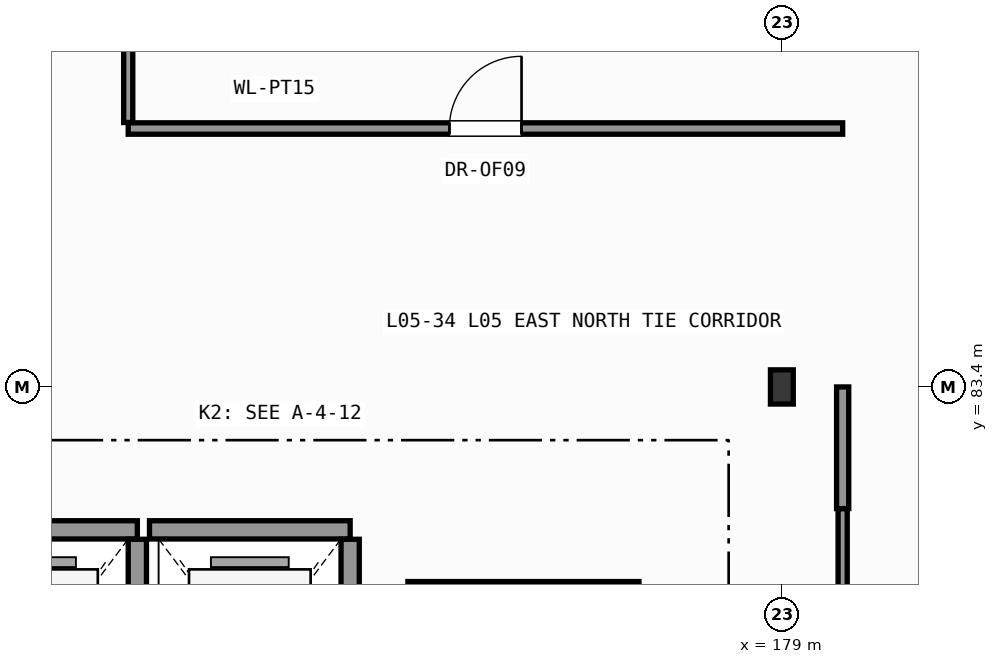
"""IFC4 building model, lengths in metres.
Left out: names, types, materials, properties, quantities, classifications, styles, units other than length and angle.
Written with IfcOpenShell. Run it as: python <this file> out.ifc"""

import sys

from ifc_helpers import new_model, si_unit, direction, frame, frame_2d, origin, origin_2d, place, context, subcontext, project, spatial, rectangle, i_section, extrude, element, fill, save


model = new_model("IFC4")
c1 = context("Model", 3, precision=1e-05, world=origin(), true_north=direction((0.0, 1.0)))
c2 = subcontext(c1, "Body", "Model", "MODEL_VIEW")
j1 = project(units=[si_unit("LENGTHUNIT", "METRE"), si_unit("PLANEANGLEUNIT", "RADIAN")], contexts=[c1])
p1 = place(None, origin())
s1 = spatial("IfcSite", under=j1, at=p1, CompositionType="ELEMENT")
p2 = place(p1, origin())
s2 = spatial("IfcBuilding", under=s1, at=p2, CompositionType="ELEMENT")
p3 = place(p2, frame((0.0, 0.0, 22.2)))
s3 = spatial("IfcBuildingStorey", under=s2, at=p3, CompositionType="ELEMENT", Elevation=22.2)
p4 = place(p3, frame((179.0, 83.4, 0.0), z_axis=(0.0, 0.0, 1.0), x_axis=(1.0, 0.0, 0.0)))
e1 = element("IfcColumn", 1, at=p4, inside=s3, PredefinedType="COLUMN", context=c2, shape_type="SweptSolid", body=[
    extrude(i_section(OverallWidth=0.3, OverallDepth=0.45, WebThickness=0.014, FlangeThickness=0.026, FilletRadius=0.027, at=origin_2d()), origin(), (0.0, 0.0, 1.0), 4.2),
])
p5 = place(p3, frame((167.88, 81.52, 0.0), z_axis=(0.0, 0.0, 1.0), x_axis=(1.0, 0.0, 0.0)))
e2 = element("IfcWall", 2, at=p5, inside=s3, PredefinedType="SHEAR", context=c2, shape_type="SweptSolid", body=[
    extrude(rectangle(XDim=2.64, YDim=0.24, at=frame_2d((1.32, 0.0))), origin(), (0.0, 0.0, 1.0), 3.98),
])
p6 = place(p3, frame((170.52, 78.204, 0.0), z_axis=(0.0, 0.0, 1.0), x_axis=(0.0, 1.0, 0.0)))
e3 = element("IfcWall", 3, at=p6, inside=s3, PredefinedType="SHEAR", context=c2, shape_type="SweptSolid", body=[
    extrude(rectangle(XDim=3.192, YDim=0.24, at=frame_2d((1.596, 0.0))), origin(), (0.0, 0.0, 1.0), 3.98),
])
p7 = place(p3, frame((170.68, 81.52, 0.0), z_axis=(0.0, 0.0, 1.0), x_axis=(1.0, 0.0, 0.0)))
e4 = element("IfcWall", 4, at=p7, inside=s3, PredefinedType="SHEAR", context=c2, shape_type="SweptSolid", body=[
    extrude(rectangle(XDim=2.64, YDim=0.24, at=frame_2d((1.32, 0.0))), origin(), (0.0, 0.0, 1.0), 3.98),
])
p8 = place(p3, frame((173.32, 78.204, 0.0), z_axis=(0.0, 0.0, 1.0), x_axis=(0.0, 1.0, 0.0)))
e5 = element("IfcWall", 5, at=p8, inside=s3, PredefinedType="SHEAR", context=c2, shape_type="SweptSolid", body=[
    extrude(rectangle(XDim=3.192, YDim=0.24, at=frame_2d((1.596, 0.0))), origin(), (0.0, 0.0, 1.0), 3.98),
])
p9 = place(p3, frame((174.08, 80.72, 0.0), z_axis=(0.0, 0.0, 1.0), x_axis=(1.0, 0.0, 0.0)))
e6 = element("IfcWall", 6, at=p9, inside=s3, PredefinedType="SHEAR", context=c2, shape_type="SweptSolid", body=[
    extrude(rectangle(XDim=3.04, YDim=0.24, at=frame_2d((1.52, 0.0))), origin(), (0.0, 0.0, 1.0), 3.98),
])
p10 = place(p3, frame((179.8, 73.5, 0.0), z_axis=(0.0, 0.0, 1.0), x_axis=(0.0, 1.0, 0.0)))
e7 = element("IfcWall", 7, at=p10, inside=s3, PredefinedType="PARTITIONING", context=c2, shape_type="SweptSolid", body=[
    extrude(rectangle(XDim=8.3, YDim=0.12, at=frame_2d((4.15, 0.0))), origin(), (0.0, 0.0, 1.0), 3.98),
])
p11 = place(p10, frame((4.31, 0.0, 0.0)))
e8 = element("IfcOpeningElement", 8, at=p11, cuts=e7, PredefinedType="OPENING", context=c2, shape_type="SweptSolid", body=[
    extrude(rectangle(XDim=2.2, YDim=2.6, at=frame_2d((1.1, 1.3))), frame((0.0, 0.07, 0.0), z_axis=(0.0, -1.0, 0.0), x_axis=(1.0, 0.0, 0.0)), (0.0, 0.0, 1.0), 0.14),
])
p12 = place(p3, frame((179.8, 81.8, 0.0), z_axis=(0.0, 0.0, 1.0), x_axis=(0.0, 1.0, 0.0)))
e9 = element("IfcWall", 9, at=p12, inside=s3, PredefinedType="PARTITIONING", context=c2, shape_type="SweptSolid", body=[
    extrude(rectangle(XDim=1.6, YDim=0.16, at=frame_2d((0.8, 0.0))), origin(), (0.0, 0.0, 1.0), 3.98),
])
p13 = place(p3, frame((170.4, 86.8, 0.0), z_axis=(0.0, 0.0, 1.0), x_axis=(1.0, 0.0, 0.0)))
e10 = element("IfcWall", 10, at=p13, inside=s3, PredefinedType="PARTITIONING", context=c2, shape_type="SweptSolid", body=[
    extrude(rectangle(XDim=9.4, YDim=0.15, at=frame_2d((4.7, 0.0))), origin(), (0.0, 0.0, 1.0), 3.665),
])
p14 = place(p13, frame((4.225, 0.0, 0.0)))
e11 = element("IfcOpeningElement", 11, at=p14, cuts=e10, PredefinedType="OPENING", context=c2, shape_type="SweptSolid", body=[
    extrude(rectangle(XDim=0.95, YDim=2.1, at=frame_2d((0.475, 1.05))), frame((0.0, 0.085, 0.0), z_axis=(0.0, -1.0, 0.0), x_axis=(1.0, 0.0, 0.0)), (0.0, 0.0, 1.0), 0.17),
])
p15 = place(p3, frame((170.4, 86.879, 0.0), z_axis=(0.0, 0.0, 1.0), x_axis=(0.0, 1.0, 0.0)))
e12 = element("IfcWall", 12, at=p15, inside=s3, PredefinedType="PARTITIONING", context=c2, shape_type="SweptSolid", body=[
    extrude(rectangle(XDim=11.121, YDim=0.12, at=frame_2d((5.561, 0.0))), origin(), (0.0, 0.0, 1.0), 3.98),
])
p16 = place(p15, frame((5.035, 0.0, 0.0)))
e13 = element("IfcOpeningElement", 13, at=p16, cuts=e12, PredefinedType="OPENING", context=c2, shape_type="SweptSolid", body=[
    extrude(rectangle(XDim=1.05, YDim=2.2, at=frame_2d((0.525, 1.1))), frame((0.0, 0.07, 0.0), z_axis=(0.0, -1.0, 0.0), x_axis=(1.0, 0.0, 0.0)), (0.0, 0.0, 1.0), 0.14),
])
p17 = place(p14, origin())
e14 = element("IfcDoor", 14, at=p17, inside=s3, OperationType="SINGLE_SWING_RIGHT", PredefinedType="DOOR", context=c2, shape_type="SweptSolid", body=[
    extrude(rectangle(XDim=0.95, YDim=2.1, at=frame_2d((0.475, 1.05))), frame((0.0, 0.025, 0.0), z_axis=(0.0, -1.0, 0.0), x_axis=(1.0, 0.0, 0.0)), (0.0, 0.0, 1.0), 0.05),
])
fill(e11, e14)
save(model, sys.argv[1])
